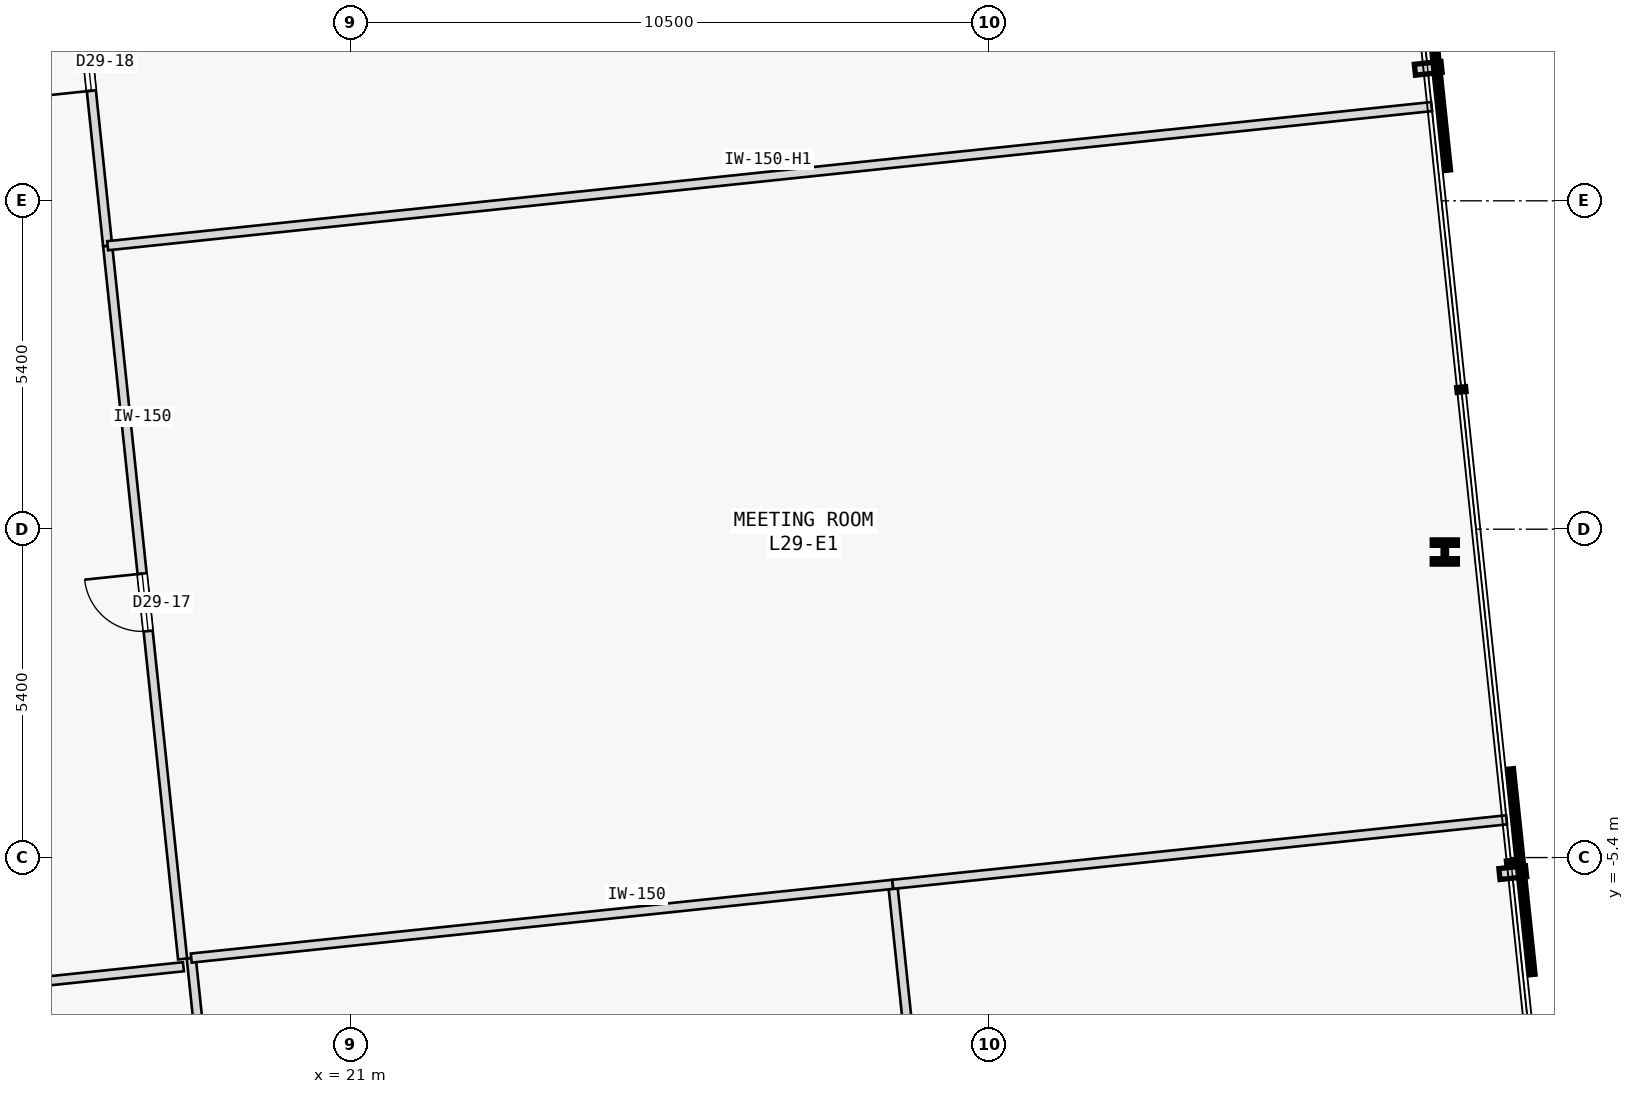
"""IFC4 building model, lengths in metres.
Left out: names, types, materials, properties, quantities, classifications, styles, units other than length and angle.
Written with IfcOpenShell. Run it as: python <this file> out.ifc"""

import sys

from ifc_helpers import new_model, si_unit, direction, frame, frame_2d, origin, origin_2d, place, context, subcontext, project, spatial, rectangle, i_section, extrude, element, fill, save


model = new_model("IFC4")
c1 = context("Model", 3, precision=1e-05, world=origin(), true_north=direction((0.0, 1.0)))
c2 = subcontext(c1, "Body", "Model", "MODEL_VIEW")
j1 = project(units=[si_unit("LENGTHUNIT", "METRE"), si_unit("PLANEANGLEUNIT", "RADIAN")], contexts=[c1])
p1 = place(None, origin())
s1 = spatial("IfcSite", under=j1, at=p1, CompositionType="ELEMENT")
p2 = place(p1, origin())
s2 = spatial("IfcBuilding", under=s1, at=p2, CompositionType="ELEMENT")
p3 = place(p2, frame((0.0, 0.0, 117.0)))
s3 = spatial("IfcBuildingStorey", under=s2, at=p3, CompositionType="ELEMENT", Elevation=117.0)
p4 = place(p3, frame((38.988, -0.375, 0.0), z_axis=(0.0, 0.0, 1.0), x_axis=(1.0, 0.0, 0.0)))
e1 = element("IfcColumn", 1, at=p4, inside=s3, PredefinedType="COLUMN", context=c2, shape_type="SweptSolid", body=[
    extrude(i_section(OverallWidth=0.413, OverallDepth=0.398, WebThickness=0.056, FlangeThickness=0.089, FilletRadius=0.015, at=origin_2d()), origin(), (0.0, 0.0, 1.0), 3.7),
])
p5 = place(p3, frame((1.082, -8.999, 0.0), z_axis=(0.0, 0.0, 1.0), x_axis=(0.994522803526, 0.104519822363, 0.0)))
e2 = element("IfcWall", 2, at=p5, inside=s3, PredefinedType="PARTITIONING", context=c2, shape_type="SweptSolid", body=[
    extrude(rectangle(XDim=17.257, YDim=0.15, at=frame_2d((8.628, 0.0))), origin(), (0.0, 0.0, 1.0), 3.475),
])
p6 = place(p5, frame((5.565, 0.0, 0.0)))
e3 = element("IfcOpeningElement", 3, at=p6, cuts=e2, PredefinedType="OPENING", context=c2, shape_type="SweptSolid", body=[
    extrude(rectangle(XDim=0.95, YDim=2.15, at=frame_2d((0.475, 1.075))), frame((0.0, 0.085, 0.0), z_axis=(0.0, -1.0, 0.0), x_axis=(1.0, 0.0, 0.0)), (0.0, 0.0, 1.0), 0.17),
])
p7 = place(p3, frame((18.231, -7.068, 0.0), z_axis=(0.0, 0.0, 1.0), x_axis=(-0.104536082083, 0.994521094569, 0.0)))
e4 = element("IfcWall", 4, at=p7, inside=s3, PredefinedType="PARTITIONING", context=c2, shape_type="SweptSolid", body=[
    extrude(rectangle(XDim=11.794, YDim=0.15, at=frame_2d((5.897, 0.0))), origin(), (0.0, 0.0, 1.0), 3.475),
])
p8 = place(p7, frame((5.422, 0.0, 0.0)))
e5 = element("IfcOpeningElement", 5, at=p8, cuts=e4, PredefinedType="OPENING", context=c2, shape_type="SweptSolid", body=[
    extrude(rectangle(XDim=0.95, YDim=2.15, at=frame_2d((0.475, 1.075))), frame((0.0, 0.085, 0.0), z_axis=(0.0, -1.0, 0.0), x_axis=(1.0, 0.0, 0.0)), (0.0, 0.0, 1.0), 0.17),
])
p9 = place(p3, frame((16.998, 4.662, 0.0), z_axis=(0.0, 0.0, 1.0), x_axis=(-0.104515354875, 0.994523273029, 0.0)))
e6 = element("IfcWall", 6, at=p9, inside=s3, PredefinedType="PARTITIONING", context=c2, shape_type="SweptSolid", body=[
    extrude(rectangle(XDim=6.076, YDim=0.15, at=frame_2d((3.038, 0.0))), origin(), (0.0, 0.0, 1.0), 3.475),
])
p10 = place(p9, frame((2.563, 0.0, 0.0)))
e7 = element("IfcOpeningElement", 7, at=p10, cuts=e6, PredefinedType="OPENING", context=c2, shape_type="SweptSolid", body=[
    extrude(rectangle(XDim=0.95, YDim=2.15, at=frame_2d((0.475, 1.075))), frame((0.0, 0.085, 0.0), z_axis=(0.0, -1.0, 0.0), x_axis=(1.0, 0.0, 0.0)), (0.0, 0.0, 1.0), 0.17),
])
p11 = place(p3, frame((19.651, -19.207, 0.0), z_axis=(0.0, 0.0, 1.0), x_axis=(-0.104540236679, 0.994520657862, 0.0)))
e8 = element("IfcWall", 8, at=p11, inside=s3, PredefinedType="PARTITIONING", context=c2, shape_type="SweptSolid", body=[
    extrude(rectangle(XDim=12.221, YDim=0.15, at=frame_2d((6.11, 0.0))), origin(), (0.0, 0.0, 1.0), 3.475),
])
p12 = place(p11, frame((5.635, 0.0, 0.0)))
e9 = element("IfcOpeningElement", 9, at=p12, cuts=e8, PredefinedType="OPENING", context=c2, shape_type="SweptSolid", body=[
    extrude(rectangle(XDim=0.95, YDim=2.15, at=frame_2d((0.475, 1.075))), frame((0.0, 0.085, 0.0), z_axis=(0.0, -1.0, 0.0), x_axis=(1.0, 0.0, 0.0)), (0.0, 0.0, 1.0), 0.17),
])
p13 = place(p3, frame((31.187, -17.994, 0.0), z_axis=(0.0, 0.0, 1.0), x_axis=(-0.104520477826, 0.99452273464, 0.0)))
e10 = element("IfcWall", 10, at=p13, inside=s3, PredefinedType="PARTITIONING", context=c2, shape_type="SweptSolid", body=[
    extrude(rectangle(XDim=12.221, YDim=0.15, at=frame_2d((6.11, 0.0))), origin(), (0.0, 0.0, 1.0), 3.475),
])
p14 = place(p13, frame((5.635, 0.0, 0.0)))
e11 = element("IfcOpeningElement", 11, at=p14, cuts=e10, PredefinedType="OPENING", context=c2, shape_type="SweptSolid", body=[
    extrude(rectangle(XDim=0.95, YDim=2.15, at=frame_2d((0.475, 1.075))), frame((0.0, 0.085, 0.0), z_axis=(0.0, -1.0, 0.0), x_axis=(1.0, 0.0, 0.0)), (0.0, 0.0, 1.0), 0.17),
])
p15 = place(p3, frame((18.373, -7.053, 0.0), z_axis=(0.0, 0.0, 1.0), x_axis=(0.994521010406, 0.104536882776, 0.0)))
e12 = element("IfcWall", 12, at=p15, inside=s3, PredefinedType="PARTITIONING", context=c2, shape_type="SweptSolid", body=[
    extrude(rectangle(XDim=11.6, YDim=0.15, at=frame_2d((5.8, 0.0))), origin(), (0.0, 0.0, 1.0), 3.475),
])
p16 = place(p3, frame((29.91, -5.84, 0.0), z_axis=(0.0, 0.0, 1.0), x_axis=(0.994521257273, 0.104534534165, 0.0)))
e13 = element("IfcWall", 13, at=p16, inside=s3, PredefinedType="PARTITIONING", context=c2, shape_type="SweptSolid", body=[
    extrude(rectangle(XDim=10.15, YDim=0.15, at=frame_2d((5.075, 0.0))), origin(), (0.0, 0.0, 1.0), 3.475),
])
p17 = place(p3, frame((16.998, 4.662, 0.0), z_axis=(0.0, 0.0, 1.0), x_axis=(0.994522487751, 0.10452282697, 0.0)))
e14 = element("IfcWall", 14, at=p17, inside=s3, PredefinedType="PARTITIONING", context=c2, shape_type="SweptSolid", body=[
    extrude(rectangle(XDim=21.893, YDim=0.15, at=frame_2d((10.947, 0.0))), origin(), (0.0, 0.0, 1.0), 3.025),
])
p18 = place(p8, origin())
e15 = element("IfcDoor", 15, at=p18, inside=s3, OperationType="SINGLE_SWING_RIGHT", PredefinedType="DOOR", context=c2, shape_type="SweptSolid", body=[
    extrude(rectangle(XDim=0.95, YDim=2.15, at=frame_2d((0.475, 1.075))), frame((0.0, 0.025, 0.0), z_axis=(0.0, -1.0, 0.0), x_axis=(1.0, 0.0, 0.0)), (0.0, 0.0, 1.0), 0.05),
])
fill(e5, e15)
p19 = place(p10, origin())
e16 = element("IfcDoor", 16, at=p19, inside=s3, OperationType="SINGLE_SWING_LEFT", PredefinedType="DOOR", context=c2, shape_type="SweptSolid", body=[
    extrude(rectangle(XDim=0.95, YDim=2.15, at=frame_2d((0.475, 1.075))), frame((0.0, 0.025, 0.0), z_axis=(0.0, -1.0, 0.0), x_axis=(1.0, 0.0, 0.0)), (0.0, 0.0, 1.0), 0.05),
])
fill(e7, e16)
save(model, sys.argv[1])
